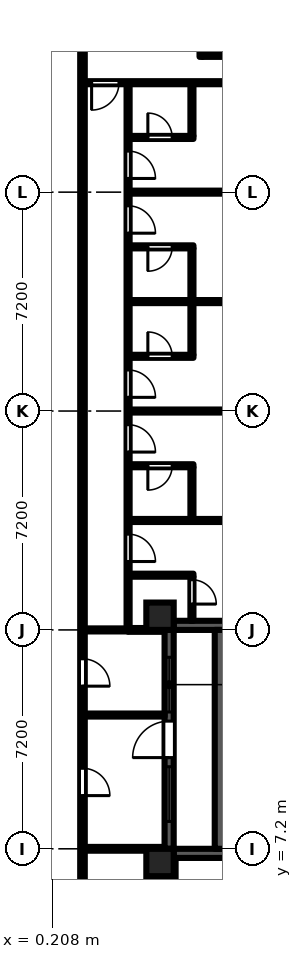
"""IFC4 building model, lengths in metres.
Left out: names, types, materials, properties, quantities, classifications, styles, units other than length and angle.
Written with IfcOpenShell. Run it as: python <this file> out.ifc"""

import sys

from ifc_helpers import new_model, si_unit, direction, frame, frame_2d, origin, origin_2d, place, context, subcontext, project, spatial, rectangle, extrude, element, fill, save


model = new_model("IFC4")
c1 = context("Model", 3, precision=1e-05, world=origin(), true_north=direction((0.0, 1.0)))
c2 = subcontext(c1, "Body", "Model", "MODEL_VIEW")
j1 = project(units=[si_unit("LENGTHUNIT", "METRE"), si_unit("PLANEANGLEUNIT", "RADIAN")], contexts=[c1])
p1 = place(None, origin())
s1 = spatial("IfcSite", under=j1, at=p1, CompositionType="ELEMENT")
p2 = place(p1, origin())
s2 = spatial("IfcBuilding", under=s1, at=p2, CompositionType="ELEMENT")
p3 = place(p2, frame((0.0, 0.0, 11.7)))
s3 = spatial("IfcBuildingStorey", under=s2, at=p3, CompositionType="ELEMENT", Elevation=11.7)
for number, where, z_axis, x_axis in (
    (1, (3.75, 6.75, 0.0), (0.0, 0.0, 1.0), (1.0, 0.0, 0.0)),
    (2, (3.75, 14.85, 0.0), (0.0, 0.0, 1.0), (1.0, 0.0, 0.0)),
):
    element("IfcColumn", number, at=place(p3, frame(where, z_axis=z_axis, x_axis=x_axis)), inside=s3, PredefinedType="COLUMN", context=c2, shape_type="SweptSolid", body=[
        extrude(rectangle(XDim=0.9, YDim=0.9, at=origin_2d()), origin(), (0.0, 0.0, 1.0), 3.0),
    ])
p4 = place(p3, frame((7.2, 7.05, 0.0), z_axis=(0.0, 0.0, 1.0), x_axis=(-1.0, 0.0, 0.0)))
e3 = element("IfcWall", 3, at=p4, inside=s3, PredefinedType="SOLIDWALL", context=c2, shape_type="SweptSolid", body=[
    extrude(rectangle(XDim=3.0, YDim=0.3, at=frame_2d((1.5, 0.0))), origin(), (0.0, 0.0, 1.0), 2.1),
])
p5 = place(p3, frame((4.05, 7.2, 0.0), z_axis=(0.0, 0.0, 1.0), x_axis=(0.0, 1.0, 0.0)))
e4 = element("IfcWall", 4, at=p5, inside=s3, PredefinedType="SOLIDWALL", context=c2, shape_type="SweptSolid", body=[
    extrude(rectangle(XDim=7.2, YDim=0.3, at=frame_2d((3.6, 0.0))), origin(), (0.0, 0.0, 1.0), 2.1),
])
p6 = place(p5, frame((3.0, 0.0, 0.0)))
e5 = element("IfcOpeningElement", 5, at=p6, cuts=e4, PredefinedType="OPENING", context=c2, shape_type="SweptSolid", body=[
    extrude(rectangle(XDim=1.2, YDim=2.05, at=frame_2d((0.6, 1.025))), frame((0.0, 0.16, 0.0), z_axis=(0.0, -1.0, 0.0), x_axis=(1.0, 0.0, 0.0)), (0.0, 0.0, 1.0), 0.32),
])
p7 = place(p5, frame((0.9, 0.0, 0.2)))
e6 = element("IfcOpeningElement", 6, at=p7, cuts=e4, PredefinedType="OPENING", context=c2, shape_type="SweptSolid", body=[
    extrude(rectangle(XDim=1.8, YDim=1.85, at=frame_2d((0.9, 0.925))), frame((0.0, 0.16, 0.0), z_axis=(0.0, -1.0, 0.0), x_axis=(1.0, 0.0, 0.0)), (0.0, 0.0, 1.0), 0.32),
])
p8 = place(p5, frame((4.5, 0.0, 0.2)))
e7 = element("IfcOpeningElement", 7, at=p8, cuts=e4, PredefinedType="OPENING", context=c2, shape_type="SweptSolid", body=[
    extrude(rectangle(XDim=1.8, YDim=1.85, at=frame_2d((0.9, 0.925))), frame((0.0, 0.16, 0.0), z_axis=(0.0, -1.0, 0.0), x_axis=(1.0, 0.0, 0.0)), (0.0, 0.0, 1.0), 0.32),
])
p9 = place(p3, frame((4.2, 14.55, 0.0), z_axis=(0.0, 0.0, 1.0), x_axis=(1.0, 0.0, 0.0)))
e8 = element("IfcWall", 8, at=p9, inside=s3, PredefinedType="SOLIDWALL", context=c2, shape_type="SweptSolid", body=[
    extrude(rectangle(XDim=2.1, YDim=0.3, at=frame_2d((1.05, 0.0))), origin(), (0.0, 0.0, 1.0), 2.1),
])
p10 = place(p3, frame((6.0, 7.2, 0.0), z_axis=(0.0, 0.0, 1.0), x_axis=(0.0, 1.0, 0.0)))
e9 = element("IfcWall", 9, at=p10, inside=s3, PredefinedType="PARAPET", context=c2, shape_type="SweptSolid", body=[
    extrude(rectangle(XDim=7.2, YDim=0.9, at=frame_2d((3.6, 0.0))), origin(), (0.0, 0.0, 1.0), 0.8),
])
p11 = place(p3, frame((1.2, 1.125, 0.0), z_axis=(0.0, 0.0, 1.0), x_axis=(0.0, 1.0, 0.0)))
e10 = element("IfcWall", 10, at=p11, inside=s3, PredefinedType="PARTITIONING", context=c2, shape_type="SweptSolid", body=[
    extrude(rectangle(XDim=35.375, YDim=0.15, at=frame_2d((17.688, 0.0))), origin(), (0.0, 0.0, 1.0), 2.575),
])
p12 = place(p11, frame((2.625, 0.0, 0.0)))
e11 = element("IfcOpeningElement", 11, at=p12, cuts=e10, PredefinedType="OPENING", context=c2, shape_type="SweptSolid", body=[
    extrude(rectangle(XDim=0.9, YDim=2.1, at=frame_2d((0.45, 1.05))), frame((0.0, 0.085, 0.0), z_axis=(0.0, -1.0, 0.0), x_axis=(1.0, 0.0, 0.0)), (0.0, 0.0, 1.0), 0.17),
])
p13 = place(p11, frame((11.425, 0.0, 0.0)))
e12 = element("IfcOpeningElement", 12, at=p13, cuts=e10, PredefinedType="OPENING", context=c2, shape_type="SweptSolid", body=[
    extrude(rectangle(XDim=0.9, YDim=2.1, at=frame_2d((0.45, 1.05))), frame((0.0, 0.085, 0.0), z_axis=(0.0, -1.0, 0.0), x_axis=(1.0, 0.0, 0.0)), (0.0, 0.0, 1.0), 0.17),
])
p14 = place(p11, frame((7.825, 0.0, 0.0)))
e13 = element("IfcOpeningElement", 13, at=p14, cuts=e10, PredefinedType="OPENING", context=c2, shape_type="SweptSolid", body=[
    extrude(rectangle(XDim=0.9, YDim=2.1, at=frame_2d((0.45, 1.05))), frame((0.0, 0.085, 0.0), z_axis=(0.0, -1.0, 0.0), x_axis=(1.0, 0.0, 0.0)), (0.0, 0.0, 1.0), 0.17),
])
p15 = place(p11, frame((32.825, 0.0, 0.0)))
e14 = element("IfcOpeningElement", 14, at=p15, cuts=e10, PredefinedType="OPENING", context=c2, shape_type="SweptSolid", body=[
    extrude(rectangle(XDim=1.0, YDim=2.1, at=frame_2d((0.5, 1.05))), frame((0.0, 0.085, 0.0), z_axis=(0.0, -1.0, 0.0), x_axis=(1.0, 0.0, 0.0)), (0.0, 0.0, 1.0), 0.17),
])
p16 = place(p3, frame((1.275, 7.2, 0.0), z_axis=(0.0, 0.0, 1.0), x_axis=(1.0, 0.0, 0.0)))
e15 = element("IfcWall", 15, at=p16, inside=s3, PredefinedType="PARTITIONING", context=c2, shape_type="SweptSolid", body=[
    extrude(rectangle(XDim=2.625, YDim=0.125, at=frame_2d((1.312, 0.0))), origin(), (0.0, 0.0, 1.0), 2.575),
])
p17 = place(p3, frame((1.275, 11.6, 0.0), z_axis=(0.0, 0.0, 1.0), x_axis=(1.0, 0.0, 0.0)))
e16 = element("IfcWall", 16, at=p17, inside=s3, PredefinedType="PARTITIONING", context=c2, shape_type="SweptSolid", body=[
    extrude(rectangle(XDim=2.625, YDim=0.1, at=frame_2d((1.312, 0.0))), origin(), (0.0, 0.0, 1.0), 2.575),
])
p18 = place(p3, frame((1.275, 14.4, 0.0), z_axis=(0.0, 0.0, 1.0), x_axis=(1.0, 0.0, 0.0)))
e17 = element("IfcWall", 17, at=p18, inside=s3, PredefinedType="PARTITIONING", context=c2, shape_type="SweptSolid", body=[
    extrude(rectangle(XDim=1.425, YDim=0.1, at=frame_2d((0.712, 0.0))), origin(), (0.0, 0.0, 1.0), 2.575),
])
p19 = place(p3, frame((1.275, 32.4, 0.0), z_axis=(0.0, 0.0, 1.0), x_axis=(1.0, 0.0, 0.0)))
e18 = element("IfcWall", 18, at=p19, inside=s3, PredefinedType="PARTITIONING", context=c2, shape_type="SweptSolid", body=[
    extrude(rectangle(XDim=5.625, YDim=0.1, at=frame_2d((2.812, 0.0))), origin(), (0.0, 0.0, 1.0), 2.575),
])
p20 = place(p19, frame((0.225, 0.0, 0.0)))
e19 = element("IfcOpeningElement", 19, at=p20, cuts=e18, PredefinedType="OPENING", context=c2, shape_type="SweptSolid", body=[
    extrude(rectangle(XDim=0.9, YDim=2.1, at=frame_2d((0.45, 1.05))), frame((0.0, 0.06, 0.0), z_axis=(0.0, -1.0, 0.0), x_axis=(1.0, 0.0, 0.0)), (0.0, 0.0, 1.0), 0.12),
])
p21 = place(p3, frame((2.7, 14.462, 0.0), z_axis=(0.0, 0.0, 1.0), x_axis=(0.0, 1.0, 0.0)))
e20 = element("IfcWall", 20, at=p21, inside=s3, PredefinedType="PARTITIONING", context=c2, shape_type="SweptSolid", body=[
    extrude(rectangle(XDim=17.888, YDim=0.1, at=frame_2d((8.944, 0.0))), origin(), (0.0, 0.0, 1.0), 2.575),
])
p22 = place(p21, frame((2.188, 0.0, 0.0)))
e21 = element("IfcOpeningElement", 21, at=p22, cuts=e20, PredefinedType="OPENING", context=c2, shape_type="SweptSolid", body=[
    extrude(rectangle(XDim=0.9, YDim=2.1, at=frame_2d((0.45, 1.05))), frame((0.0, 0.06, 0.0), z_axis=(0.0, -1.0, 0.0), x_axis=(1.0, 0.0, 0.0)), (0.0, 0.0, 1.0), 0.12),
])
p23 = place(p21, frame((5.788, 0.0, 0.0)))
e22 = element("IfcOpeningElement", 22, at=p23, cuts=e20, PredefinedType="OPENING", context=c2, shape_type="SweptSolid", body=[
    extrude(rectangle(XDim=0.9, YDim=2.1, at=frame_2d((0.45, 1.05))), frame((0.0, 0.06, 0.0), z_axis=(0.0, -1.0, 0.0), x_axis=(1.0, 0.0, 0.0)), (0.0, 0.0, 1.0), 0.12),
])
p24 = place(p21, frame((7.587, 0.0, 0.0)))
e23 = element("IfcOpeningElement", 23, at=p24, cuts=e20, PredefinedType="OPENING", context=c2, shape_type="SweptSolid", body=[
    extrude(rectangle(XDim=0.9, YDim=2.1, at=frame_2d((0.45, 1.05))), frame((0.0, 0.06, 0.0), z_axis=(0.0, -1.0, 0.0), x_axis=(1.0, 0.0, 0.0)), (0.0, 0.0, 1.0), 0.12),
])
p25 = place(p21, frame((12.988, 0.0, 0.0)))
e24 = element("IfcOpeningElement", 24, at=p25, cuts=e20, PredefinedType="OPENING", context=c2, shape_type="SweptSolid", body=[
    extrude(rectangle(XDim=0.9, YDim=2.1, at=frame_2d((0.45, 1.05))), frame((0.0, 0.06, 0.0), z_axis=(0.0, -1.0, 0.0), x_axis=(1.0, 0.0, 0.0)), (0.0, 0.0, 1.0), 0.12),
])
p26 = place(p21, frame((14.788, 0.0, 0.0)))
e25 = element("IfcOpeningElement", 25, at=p26, cuts=e20, PredefinedType="OPENING", context=c2, shape_type="SweptSolid", body=[
    extrude(rectangle(XDim=0.9, YDim=2.1, at=frame_2d((0.45, 1.05))), frame((0.0, 0.06, 0.0), z_axis=(0.0, -1.0, 0.0), x_axis=(1.0, 0.0, 0.0)), (0.0, 0.0, 1.0), 0.12),
])
p27 = place(p3, frame((2.7, 14.4, 0.0), z_axis=(0.0, 0.0, 1.0), x_axis=(1.0, 0.0, 0.0)))
e26 = element("IfcWall", 26, at=p27, inside=s3, PredefinedType="PARTITIONING", context=c2, shape_type="SweptSolid", body=[
    extrude(rectangle(XDim=1.2, YDim=0.125, at=frame_2d((0.6, 0.0))), origin(), (0.0, 0.0, 1.0), 2.575),
])
p28 = place(p3, frame((2.75, 16.2, 0.0), z_axis=(0.0, 0.0, 1.0), x_axis=(1.0, 0.0, 0.0)))
e27 = element("IfcWall", 27, at=p28, inside=s3, PredefinedType="PARTITIONING", context=c2, shape_type="SweptSolid", body=[
    extrude(rectangle(XDim=2.1, YDim=0.1, at=frame_2d((1.05, 0.0))), origin(), (0.0, 0.0, 1.0), 2.575),
])
p29 = place(p3, frame((2.75, 18.0, 0.0), z_axis=(0.0, 0.0, 1.0), x_axis=(1.0, 0.0, 0.0)))
e28 = element("IfcWall", 28, at=p29, inside=s3, PredefinedType="PARTITIONING", context=c2, shape_type="SweptSolid", body=[
    extrude(rectangle(XDim=4.15, YDim=0.1, at=frame_2d((2.075, 0.0))), origin(), (0.0, 0.0, 1.0), 2.575),
])
p30 = place(p3, frame((2.75, 19.8, 0.0), z_axis=(0.0, 0.0, 1.0), x_axis=(1.0, 0.0, 0.0)))
e29 = element("IfcWall", 29, at=p30, inside=s3, PredefinedType="PARTITIONING", context=c2, shape_type="SweptSolid", body=[
    extrude(rectangle(XDim=2.1, YDim=0.1, at=frame_2d((1.05, 0.0))), origin(), (0.0, 0.0, 1.0), 2.575),
])
p31 = place(p30, frame((0.6, 0.0, 0.0)))
e30 = element("IfcOpeningElement", 30, at=p31, cuts=e29, PredefinedType="OPENING", context=c2, shape_type="SweptSolid", body=[
    extrude(rectangle(XDim=0.8, YDim=2.1, at=frame_2d((0.4, 1.05))), frame((0.0, 0.06, 0.0), z_axis=(0.0, -1.0, 0.0), x_axis=(1.0, 0.0, 0.0)), (0.0, 0.0, 1.0), 0.12),
])
p32 = place(p3, frame((2.75, 21.6, 0.0), z_axis=(0.0, 0.0, 1.0), x_axis=(1.0, 0.0, 0.0)))
e31 = element("IfcWall", 31, at=p32, inside=s3, PredefinedType="PARTITIONING", context=c2, shape_type="SweptSolid", body=[
    extrude(rectangle(XDim=4.15, YDim=0.1, at=frame_2d((2.075, 0.0))), origin(), (0.0, 0.0, 1.0), 2.575),
])
p33 = place(p3, frame((2.75, 23.4, 0.0), z_axis=(0.0, 0.0, 1.0), x_axis=(1.0, 0.0, 0.0)))
e32 = element("IfcWall", 32, at=p33, inside=s3, PredefinedType="PARTITIONING", context=c2, shape_type="SweptSolid", body=[
    extrude(rectangle(XDim=2.1, YDim=0.1, at=frame_2d((1.05, 0.0))), origin(), (0.0, 0.0, 1.0), 2.575),
])
p34 = place(p33, frame((0.6, 0.0, 0.0)))
e33 = element("IfcOpeningElement", 33, at=p34, cuts=e32, PredefinedType="OPENING", context=c2, shape_type="SweptSolid", body=[
    extrude(rectangle(XDim=0.8, YDim=2.1, at=frame_2d((0.4, 1.05))), frame((0.0, 0.06, 0.0), z_axis=(0.0, -1.0, 0.0), x_axis=(1.0, 0.0, 0.0)), (0.0, 0.0, 1.0), 0.12),
])
p35 = place(p3, frame((2.75, 25.2, 0.0), z_axis=(0.0, 0.0, 1.0), x_axis=(1.0, 0.0, 0.0)))
e34 = element("IfcWall", 34, at=p35, inside=s3, PredefinedType="PARTITIONING", context=c2, shape_type="SweptSolid", body=[
    extrude(rectangle(XDim=4.15, YDim=0.1, at=frame_2d((2.075, 0.0))), origin(), (0.0, 0.0, 1.0), 2.575),
])
p36 = place(p3, frame((2.75, 27.0, 0.0), z_axis=(0.0, 0.0, 1.0), x_axis=(1.0, 0.0, 0.0)))
e35 = element("IfcWall", 35, at=p36, inside=s3, PredefinedType="PARTITIONING", context=c2, shape_type="SweptSolid", body=[
    extrude(rectangle(XDim=2.1, YDim=0.1, at=frame_2d((1.05, 0.0))), origin(), (0.0, 0.0, 1.0), 2.575),
])
p37 = place(p36, frame((0.6, 0.0, 0.0)))
e36 = element("IfcOpeningElement", 36, at=p37, cuts=e35, PredefinedType="OPENING", context=c2, shape_type="SweptSolid", body=[
    extrude(rectangle(XDim=0.8, YDim=2.1, at=frame_2d((0.4, 1.05))), frame((0.0, 0.06, 0.0), z_axis=(0.0, -1.0, 0.0), x_axis=(1.0, 0.0, 0.0)), (0.0, 0.0, 1.0), 0.12),
])
p38 = place(p3, frame((2.75, 28.8, 0.0), z_axis=(0.0, 0.0, 1.0), x_axis=(1.0, 0.0, 0.0)))
e37 = element("IfcWall", 37, at=p38, inside=s3, PredefinedType="PARTITIONING", context=c2, shape_type="SweptSolid", body=[
    extrude(rectangle(XDim=4.15, YDim=0.1, at=frame_2d((2.075, 0.0))), origin(), (0.0, 0.0, 1.0), 2.575),
])
p39 = place(p3, frame((2.75, 30.6, 0.0), z_axis=(0.0, 0.0, 1.0), x_axis=(1.0, 0.0, 0.0)))
e38 = element("IfcWall", 38, at=p39, inside=s3, PredefinedType="PARTITIONING", context=c2, shape_type="SweptSolid", body=[
    extrude(rectangle(XDim=2.1, YDim=0.1, at=frame_2d((1.05, 0.0))), origin(), (0.0, 0.0, 1.0), 2.575),
])
p40 = place(p39, frame((0.6, 0.0, 0.0)))
e39 = element("IfcOpeningElement", 39, at=p40, cuts=e38, PredefinedType="OPENING", context=c2, shape_type="SweptSolid", body=[
    extrude(rectangle(XDim=0.8, YDim=2.1, at=frame_2d((0.4, 1.05))), frame((0.0, 0.06, 0.0), z_axis=(0.0, -1.0, 0.0), x_axis=(1.0, 0.0, 0.0)), (0.0, 0.0, 1.0), 0.12),
])
p41 = place(p3, frame((4.2, 1.275, 0.0), z_axis=(0.0, 0.0, 1.0), x_axis=(0.0, 1.0, 0.0)))
e40 = element("IfcWall", 40, at=p41, inside=s3, PredefinedType="PARTITIONING", context=c2, shape_type="SweptSolid", body=[
    extrude(rectangle(XDim=5.625, YDim=0.125, at=frame_2d((2.812, 0.0))), origin(), (0.0, 0.0, 1.0), 2.575),
])
p42 = place(p3, frame((4.8, 14.7, 0.0), z_axis=(0.0, 0.0, 1.0), x_axis=(0.0, 1.0, 0.0)))
e41 = element("IfcWall", 41, at=p42, inside=s3, PredefinedType="PARTITIONING", context=c2, shape_type="SweptSolid", body=[
    extrude(rectangle(XDim=1.45, YDim=0.1, at=frame_2d((0.725, 0.0))), origin(), (0.0, 0.0, 1.0), 2.575),
])
p43 = place(p42, frame((0.55, 0.0, 0.0)))
e42 = element("IfcOpeningElement", 42, at=p43, cuts=e41, PredefinedType="OPENING", context=c2, shape_type="SweptSolid", body=[
    extrude(rectangle(XDim=0.8, YDim=2.1, at=frame_2d((0.4, 1.05))), frame((0.0, 0.06, 0.0), z_axis=(0.0, -1.0, 0.0), x_axis=(1.0, 0.0, 0.0)), (0.0, 0.0, 1.0), 0.12),
])
p44 = place(p3, frame((4.8, 18.05, 0.0), z_axis=(0.0, 0.0, 1.0), x_axis=(0.0, 1.0, 0.0)))
e43 = element("IfcWall", 43, at=p44, inside=s3, PredefinedType="PARTITIONING", context=c2, shape_type="SweptSolid", body=[
    extrude(rectangle(XDim=1.7, YDim=0.1, at=frame_2d((0.85, 0.0))), origin(), (0.0, 0.0, 1.0), 2.575),
])
p45 = place(p3, frame((4.8, 23.45, 0.0), z_axis=(0.0, 0.0, 1.0), x_axis=(0.0, 1.0, 0.0)))
e44 = element("IfcWall", 44, at=p45, inside=s3, PredefinedType="PARTITIONING", context=c2, shape_type="SweptSolid", body=[
    extrude(rectangle(XDim=3.5, YDim=0.1, at=frame_2d((1.75, 0.0))), origin(), (0.0, 0.0, 1.0), 2.575),
])
p46 = place(p3, frame((4.8, 30.65, 0.0), z_axis=(0.0, 0.0, 1.0), x_axis=(0.0, 1.0, 0.0)))
e45 = element("IfcWall", 45, at=p46, inside=s3, PredefinedType="PARTITIONING", context=c2, shape_type="SweptSolid", body=[
    extrude(rectangle(XDim=1.7, YDim=0.1, at=frame_2d((0.85, 0.0))), origin(), (0.0, 0.0, 1.0), 2.575),
])
p47 = place(p3, frame((5.1, 33.25, 0.0), z_axis=(0.0, 0.0, 1.0), x_axis=(0.0, 1.0, 0.0)))
e46 = element("IfcWall", 46, at=p47, inside=s3, PredefinedType="PARTITIONING", context=c2, shape_type="SweptSolid", body=[
    extrude(rectangle(XDim=1.9, YDim=0.1, at=frame_2d((0.95, 0.0))), origin(), (0.0, 0.0, 1.0), 2.575),
])
p48 = place(p47, frame((0.55, 0.0, 0.0)))
e47 = element("IfcOpeningElement", 47, at=p48, cuts=e46, PredefinedType="OPENING", context=c2, shape_type="SweptSolid", body=[
    extrude(rectangle(XDim=0.8, YDim=2.1, at=frame_2d((0.4, 1.05))), frame((0.0, 0.06, 0.0), z_axis=(0.0, -1.0, 0.0), x_axis=(1.0, 0.0, 0.0)), (0.0, 0.0, 1.0), 0.12),
])
p49 = place(p3, frame((5.15, 33.3, 0.0), z_axis=(0.0, 0.0, 1.0), x_axis=(1.0, 0.0, 0.0)))
e48 = element("IfcWall", 48, at=p49, inside=s3, PredefinedType="PARTITIONING", context=c2, shape_type="SweptSolid", body=[
    extrude(rectangle(XDim=1.75, YDim=0.1, at=frame_2d((0.875, 0.0))), origin(), (0.0, 0.0, 1.0), 2.575),
])
p50 = place(p6, origin())
e49 = element("IfcDoor", 49, at=p50, inside=s3, OperationType="SINGLE_SWING_LEFT", PredefinedType="DOOR", context=c2, shape_type="SweptSolid", body=[
    extrude(rectangle(XDim=1.2, YDim=2.05, at=frame_2d((0.6, 1.025))), frame((0.0, 0.025, 0.0), z_axis=(0.0, -1.0, 0.0), x_axis=(1.0, 0.0, 0.0)), (0.0, 0.0, 1.0), 0.05),
])
fill(e5, e49)
p51 = place(p7, origin())
e50 = element("IfcWindow", 50, at=p51, inside=s3, PartitioningType="SINGLE_PANEL", PredefinedType="WINDOW", context=c2, shape_type="SweptSolid", body=[
    extrude(rectangle(XDim=1.8, YDim=1.85, at=frame_2d((0.9, 0.925))), frame((0.0, 0.03, 0.0), z_axis=(0.0, -1.0, 0.0), x_axis=(1.0, 0.0, 0.0)), (0.0, 0.0, 1.0), 0.06),
])
fill(e6, e50)
p52 = place(p8, origin())
e51 = element("IfcWindow", 51, at=p52, inside=s3, PartitioningType="SINGLE_PANEL", PredefinedType="WINDOW", context=c2, shape_type="SweptSolid", body=[
    extrude(rectangle(XDim=1.8, YDim=1.85, at=frame_2d((0.9, 0.925))), frame((0.0, 0.03, 0.0), z_axis=(0.0, -1.0, 0.0), x_axis=(1.0, 0.0, 0.0)), (0.0, 0.0, 1.0), 0.06),
])
fill(e7, e51)
p53 = place(p13, frame((0.9, 0.0, 0.0), z_axis=(0.0, 0.0, 1.0), x_axis=(-1.0, 0.0, 0.0)))
e52 = element("IfcDoor", 52, at=p53, inside=s3, OperationType="SINGLE_SWING_RIGHT", PredefinedType="DOOR", context=c2, shape_type="SweptSolid", body=[
    extrude(rectangle(XDim=0.9, YDim=2.1, at=frame_2d((0.45, 1.05))), frame((0.0, 0.025, 0.0), z_axis=(0.0, -1.0, 0.0), x_axis=(1.0, 0.0, 0.0)), (0.0, 0.0, 1.0), 0.05),
])
fill(e12, e52)
p54 = place(p14, frame((0.9, 0.0, 0.0), z_axis=(0.0, 0.0, 1.0), x_axis=(-1.0, 0.0, 0.0)))
e53 = element("IfcDoor", 53, at=p54, inside=s3, OperationType="SINGLE_SWING_RIGHT", PredefinedType="DOOR", context=c2, shape_type="SweptSolid", body=[
    extrude(rectangle(XDim=0.9, YDim=2.1, at=frame_2d((0.45, 1.05))), frame((0.0, 0.025, 0.0), z_axis=(0.0, -1.0, 0.0), x_axis=(1.0, 0.0, 0.0)), (0.0, 0.0, 1.0), 0.05),
])
fill(e13, e53)
p55 = place(p20, frame((0.9, 0.0, 0.0), z_axis=(0.0, 0.0, 1.0), x_axis=(-1.0, 0.0, 0.0)))
e54 = element("IfcDoor", 54, at=p55, inside=s3, OperationType="SINGLE_SWING_RIGHT", PredefinedType="DOOR", context=c2, shape_type="SweptSolid", body=[
    extrude(rectangle(XDim=0.9, YDim=2.1, at=frame_2d((0.45, 1.05))), frame((0.0, 0.025, 0.0), z_axis=(0.0, -1.0, 0.0), x_axis=(1.0, 0.0, 0.0)), (0.0, 0.0, 1.0), 0.05),
])
fill(e19, e54)
p56 = place(p22, frame((0.9, 0.0, 0.0), z_axis=(0.0, 0.0, 1.0), x_axis=(-1.0, 0.0, 0.0)))
e55 = element("IfcDoor", 55, at=p56, inside=s3, OperationType="SINGLE_SWING_RIGHT", PredefinedType="DOOR", context=c2, shape_type="SweptSolid", body=[
    extrude(rectangle(XDim=0.9, YDim=2.1, at=frame_2d((0.45, 1.05))), frame((0.0, 0.025, 0.0), z_axis=(0.0, -1.0, 0.0), x_axis=(1.0, 0.0, 0.0)), (0.0, 0.0, 1.0), 0.05),
])
fill(e21, e55)
p57 = place(p23, frame((0.9, 0.0, 0.0), z_axis=(0.0, 0.0, 1.0), x_axis=(-1.0, 0.0, 0.0)))
e56 = element("IfcDoor", 56, at=p57, inside=s3, OperationType="SINGLE_SWING_RIGHT", PredefinedType="DOOR", context=c2, shape_type="SweptSolid", body=[
    extrude(rectangle(XDim=0.9, YDim=2.1, at=frame_2d((0.45, 1.05))), frame((0.0, 0.025, 0.0), z_axis=(0.0, -1.0, 0.0), x_axis=(1.0, 0.0, 0.0)), (0.0, 0.0, 1.0), 0.05),
])
fill(e22, e56)
p58 = place(p24, frame((0.9, 0.0, 0.0), z_axis=(0.0, 0.0, 1.0), x_axis=(-1.0, 0.0, 0.0)))
e57 = element("IfcDoor", 57, at=p58, inside=s3, OperationType="SINGLE_SWING_RIGHT", PredefinedType="DOOR", context=c2, shape_type="SweptSolid", body=[
    extrude(rectangle(XDim=0.9, YDim=2.1, at=frame_2d((0.45, 1.05))), frame((0.0, 0.025, 0.0), z_axis=(0.0, -1.0, 0.0), x_axis=(1.0, 0.0, 0.0)), (0.0, 0.0, 1.0), 0.05),
])
fill(e23, e57)
p59 = place(p25, frame((0.9, 0.0, 0.0), z_axis=(0.0, 0.0, 1.0), x_axis=(-1.0, 0.0, 0.0)))
e58 = element("IfcDoor", 58, at=p59, inside=s3, OperationType="SINGLE_SWING_RIGHT", PredefinedType="DOOR", context=c2, shape_type="SweptSolid", body=[
    extrude(rectangle(XDim=0.9, YDim=2.1, at=frame_2d((0.45, 1.05))), frame((0.0, 0.025, 0.0), z_axis=(0.0, -1.0, 0.0), x_axis=(1.0, 0.0, 0.0)), (0.0, 0.0, 1.0), 0.05),
])
fill(e24, e58)
p60 = place(p26, frame((0.9, 0.0, 0.0), z_axis=(0.0, 0.0, 1.0), x_axis=(-1.0, 0.0, 0.0)))
e59 = element("IfcDoor", 59, at=p60, inside=s3, OperationType="SINGLE_SWING_RIGHT", PredefinedType="DOOR", context=c2, shape_type="SweptSolid", body=[
    extrude(rectangle(XDim=0.9, YDim=2.1, at=frame_2d((0.45, 1.05))), frame((0.0, 0.025, 0.0), z_axis=(0.0, -1.0, 0.0), x_axis=(1.0, 0.0, 0.0)), (0.0, 0.0, 1.0), 0.05),
])
fill(e25, e59)
p61 = place(p43, frame((0.8, 0.0, 0.0), z_axis=(0.0, 0.0, 1.0), x_axis=(-1.0, 0.0, 0.0)))
e60 = element("IfcDoor", 60, at=p61, inside=s3, OperationType="SINGLE_SWING_RIGHT", PredefinedType="DOOR", context=c2, shape_type="SweptSolid", body=[
    extrude(rectangle(XDim=0.8, YDim=2.1, at=frame_2d((0.4, 1.05))), frame((0.0, 0.025, 0.0), z_axis=(0.0, -1.0, 0.0), x_axis=(1.0, 0.0, 0.0)), (0.0, 0.0, 1.0), 0.05),
])
fill(e42, e60)
p62 = place(p31, frame((0.8, 0.0, 0.0), z_axis=(0.0, 0.0, 1.0), x_axis=(-1.0, 0.0, 0.0)))
e61 = element("IfcDoor", 61, at=p62, inside=s3, OperationType="SINGLE_SWING_RIGHT", PredefinedType="DOOR", context=c2, shape_type="SweptSolid", body=[
    extrude(rectangle(XDim=0.8, YDim=2.1, at=frame_2d((0.4, 1.05))), frame((0.0, 0.025, 0.0), z_axis=(0.0, -1.0, 0.0), x_axis=(1.0, 0.0, 0.0)), (0.0, 0.0, 1.0), 0.05),
])
fill(e30, e61)
p63 = place(p34, origin())
e62 = element("IfcDoor", 62, at=p63, inside=s3, OperationType="SINGLE_SWING_LEFT", PredefinedType="DOOR", context=c2, shape_type="SweptSolid", body=[
    extrude(rectangle(XDim=0.8, YDim=2.1, at=frame_2d((0.4, 1.05))), frame((0.0, 0.025, 0.0), z_axis=(0.0, -1.0, 0.0), x_axis=(1.0, 0.0, 0.0)), (0.0, 0.0, 1.0), 0.05),
])
fill(e33, e62)
p64 = place(p37, frame((0.8, 0.0, 0.0), z_axis=(0.0, 0.0, 1.0), x_axis=(-1.0, 0.0, 0.0)))
e63 = element("IfcDoor", 63, at=p64, inside=s3, OperationType="SINGLE_SWING_RIGHT", PredefinedType="DOOR", context=c2, shape_type="SweptSolid", body=[
    extrude(rectangle(XDim=0.8, YDim=2.1, at=frame_2d((0.4, 1.05))), frame((0.0, 0.025, 0.0), z_axis=(0.0, -1.0, 0.0), x_axis=(1.0, 0.0, 0.0)), (0.0, 0.0, 1.0), 0.05),
])
fill(e36, e63)
p65 = place(p40, origin())
e64 = element("IfcDoor", 64, at=p65, inside=s3, OperationType="SINGLE_SWING_LEFT", PredefinedType="DOOR", context=c2, shape_type="SweptSolid", body=[
    extrude(rectangle(XDim=0.8, YDim=2.1, at=frame_2d((0.4, 1.05))), frame((0.0, 0.025, 0.0), z_axis=(0.0, -1.0, 0.0), x_axis=(1.0, 0.0, 0.0)), (0.0, 0.0, 1.0), 0.05),
])
fill(e39, e64)
save(model, sys.argv[1])
